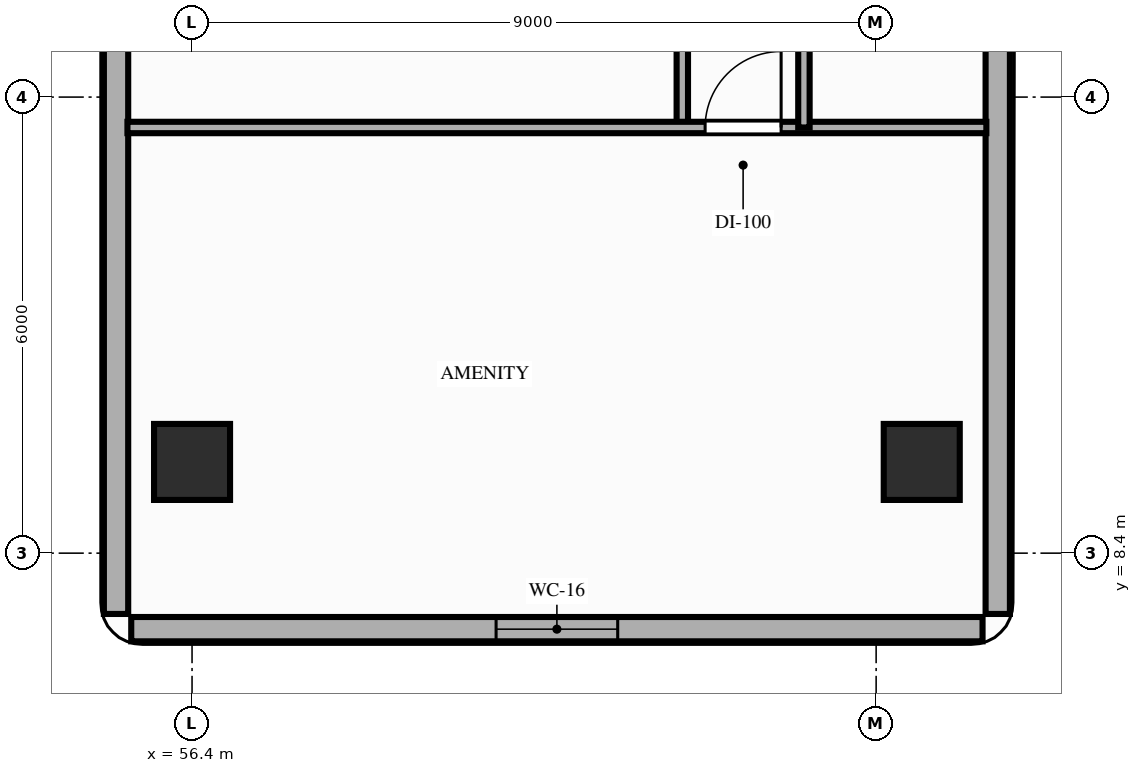
"""IFC4 building model, lengths in metres.
Left out: names, types, materials, properties, quantities, classifications, styles, units other than length and angle.
Written with IfcOpenShell. Run it as: python <this file> out.ifc"""

import sys

from ifc_helpers import new_model, si_unit, direction, frame, frame_2d, origin, origin_2d, place, context, subcontext, project, spatial, rectangle, extrude, element, fill, save


model = new_model("IFC4")
c1 = context("Model", 3, precision=1e-05, world=origin(), true_north=direction((0.0, 1.0)))
c2 = subcontext(c1, "Body", "Model", "MODEL_VIEW")
j1 = project(units=[si_unit("LENGTHUNIT", "METRE"), si_unit("PLANEANGLEUNIT", "RADIAN")], contexts=[c1])
p1 = place(None, origin())
s1 = spatial("IfcSite", under=j1, at=p1, CompositionType="ELEMENT")
p2 = place(p1, origin())
s2 = spatial("IfcBuilding", under=s1, at=p2, CompositionType="ELEMENT")
p3 = place(p2, frame((0.0, 0.0, 39.8)))
s3 = spatial("IfcBuildingStorey", under=s2, at=p3, CompositionType="ELEMENT", Elevation=39.8)
for number, where, z_axis, x_axis in (
    (1, (56.4, 9.6, 0.0), (0.0, 0.0, 1.0), (1.0, 0.0, 0.0)),
    (2, (66.0, 9.6, 0.0), (0.0, 0.0, 1.0), (1.0, 0.0, 0.0)),
):
    element("IfcColumn", number, at=place(p3, frame(where, z_axis=z_axis, x_axis=x_axis)), inside=s3, PredefinedType="COLUMN", context=c2, shape_type="SweptSolid", body=[
        extrude(rectangle(XDim=1.0, YDim=1.0, at=origin_2d()), origin(), (0.0, 0.0, 1.0), 3.8),
    ])
p4 = place(p3, frame((55.6, 7.4, 0.0), z_axis=(0.0, 0.0, 1.0), x_axis=(1.0, 0.0, 0.0)))
e3 = element("IfcWall", 3, at=p4, inside=s3, PredefinedType="STANDARD", context=c2, shape_type="SweptSolid", body=[
    extrude(rectangle(XDim=11.2, YDim=0.32, at=frame_2d((5.6, 0.0))), origin(), (0.0, 0.0, 1.0), 3.62),
])
p5 = place(p4, frame((4.8, 0.0, 0.85)))
e4 = element("IfcOpeningElement", 4, at=p5, cuts=e3, PredefinedType="OPENING", context=c2, shape_type="SweptSolid", body=[
    extrude(rectangle(XDim=1.6, YDim=1.7, at=frame_2d((0.8, 0.85))), frame((0.0, 0.17, 0.0), z_axis=(0.0, -1.0, 0.0), x_axis=(1.0, 0.0, 0.0)), (0.0, 0.0, 1.0), 0.34),
])
for number, where, z_axis, x_axis in (
    (5, (55.4, 20.4, 0.0), (0.0, 0.0, 1.0), (0.0, -1.0, 0.0)),
    (6, (67.0, 7.6, 0.0), (0.0, 0.0, 1.0), (0.0, 1.0, 0.0)),
):
    element("IfcWall", number, at=place(p3, frame(where, z_axis=z_axis, x_axis=x_axis)), inside=s3, PredefinedType="STANDARD", context=c2, shape_type="SweptSolid", body=[
        extrude(rectangle(XDim=12.8, YDim=0.32, at=frame_2d((6.4, 0.0))), origin(), (0.0, 0.0, 1.0), 3.62),
    ])
p6 = place(p3, frame((62.85, 14.0, 0.0), z_axis=(0.0, 0.0, 1.0), x_axis=(0.0, 1.0, 0.0)))
e7 = element("IfcWall", 7, at=p6, inside=s3, PredefinedType="PARTITIONING", context=c2, shape_type="SweptSolid", body=[
    extrude(rectangle(XDim=6.75, YDim=0.15, at=frame_2d((3.375, 0.0))), origin(), (0.0, 0.0, 1.0), 3.11),
])
p7 = place(p6, frame((2.6, 0.0, 0.0)))
e8 = element("IfcOpeningElement", 8, at=p7, cuts=e7, PredefinedType="OPENING", context=c2, shape_type="SweptSolid", body=[
    extrude(rectangle(XDim=0.95, YDim=2.15, at=frame_2d((0.475, 1.075))), frame((0.0, 0.085, 0.0), z_axis=(0.0, -1.0, 0.0), x_axis=(1.0, 0.0, 0.0)), (0.0, 0.0, 1.0), 0.17),
])
p8 = place(p3, frame((55.55, 14.0, 0.0), z_axis=(0.0, 0.0, 1.0), x_axis=(1.0, 0.0, 0.0)))
e9 = element("IfcWall", 9, at=p8, inside=s3, PredefinedType="PARTITIONING", context=c2, shape_type="SweptSolid", body=[
    extrude(rectangle(XDim=11.3, YDim=0.15, at=frame_2d((5.65, 0.0))), origin(), (0.0, 0.0, 1.0), 3.11),
])
p9 = place(p8, frame((7.6, 0.0, 0.0)))
e10 = element("IfcOpeningElement", 10, at=p9, cuts=e9, PredefinedType="OPENING", context=c2, shape_type="SweptSolid", body=[
    extrude(rectangle(XDim=1.0, YDim=2.15, at=frame_2d((0.5, 1.075))), frame((0.0, 0.085, 0.0), z_axis=(0.0, -1.0, 0.0), x_axis=(1.0, 0.0, 0.0)), (0.0, 0.0, 1.0), 0.17),
])
p10 = place(p3, frame((64.45, 14.0, 0.0), z_axis=(0.0, 0.0, 1.0), x_axis=(0.0, 1.0, 0.0)))
e11 = element("IfcWall", 11, at=p10, inside=s3, PredefinedType="PARTITIONING", context=c2, shape_type="SweptSolid", body=[
    extrude(rectangle(XDim=6.75, YDim=0.15, at=frame_2d((3.375, 0.0))), origin(), (0.0, 0.0, 1.0), 3.11),
])
p11 = place(p10, frame((3.24, 0.0, 0.0)))
e12 = element("IfcOpeningElement", 12, at=p11, cuts=e11, PredefinedType="OPENING", context=c2, shape_type="SweptSolid", body=[
    extrude(rectangle(XDim=0.95, YDim=2.15, at=frame_2d((0.475, 1.075))), frame((0.0, 0.085, 0.0), z_axis=(0.0, -1.0, 0.0), x_axis=(1.0, 0.0, 0.0)), (0.0, 0.0, 1.0), 0.17),
])
p12 = place(p5, origin())
e13 = element("IfcWindow", 13, at=p12, inside=s3, PartitioningType="SINGLE_PANEL", PredefinedType="WINDOW", context=c2, shape_type="SweptSolid", body=[
    extrude(rectangle(XDim=1.6, YDim=1.7, at=frame_2d((0.8, 0.85))), frame((0.0, 0.03, 0.0), z_axis=(0.0, -1.0, 0.0), x_axis=(1.0, 0.0, 0.0)), (0.0, 0.0, 1.0), 0.06),
])
fill(e4, e13)
p13 = place(p9, origin())
e14 = element("IfcDoor", 14, at=p13, inside=s3, OperationType="SINGLE_SWING_RIGHT", PredefinedType="DOOR", context=c2, shape_type="SweptSolid", body=[
    extrude(rectangle(XDim=1.0, YDim=2.15, at=frame_2d((0.5, 1.075))), frame((0.0, 0.025, 0.0), z_axis=(0.0, -1.0, 0.0), x_axis=(1.0, 0.0, 0.0)), (0.0, 0.0, 1.0), 0.05),
])
fill(e10, e14)
save(model, sys.argv[1])
